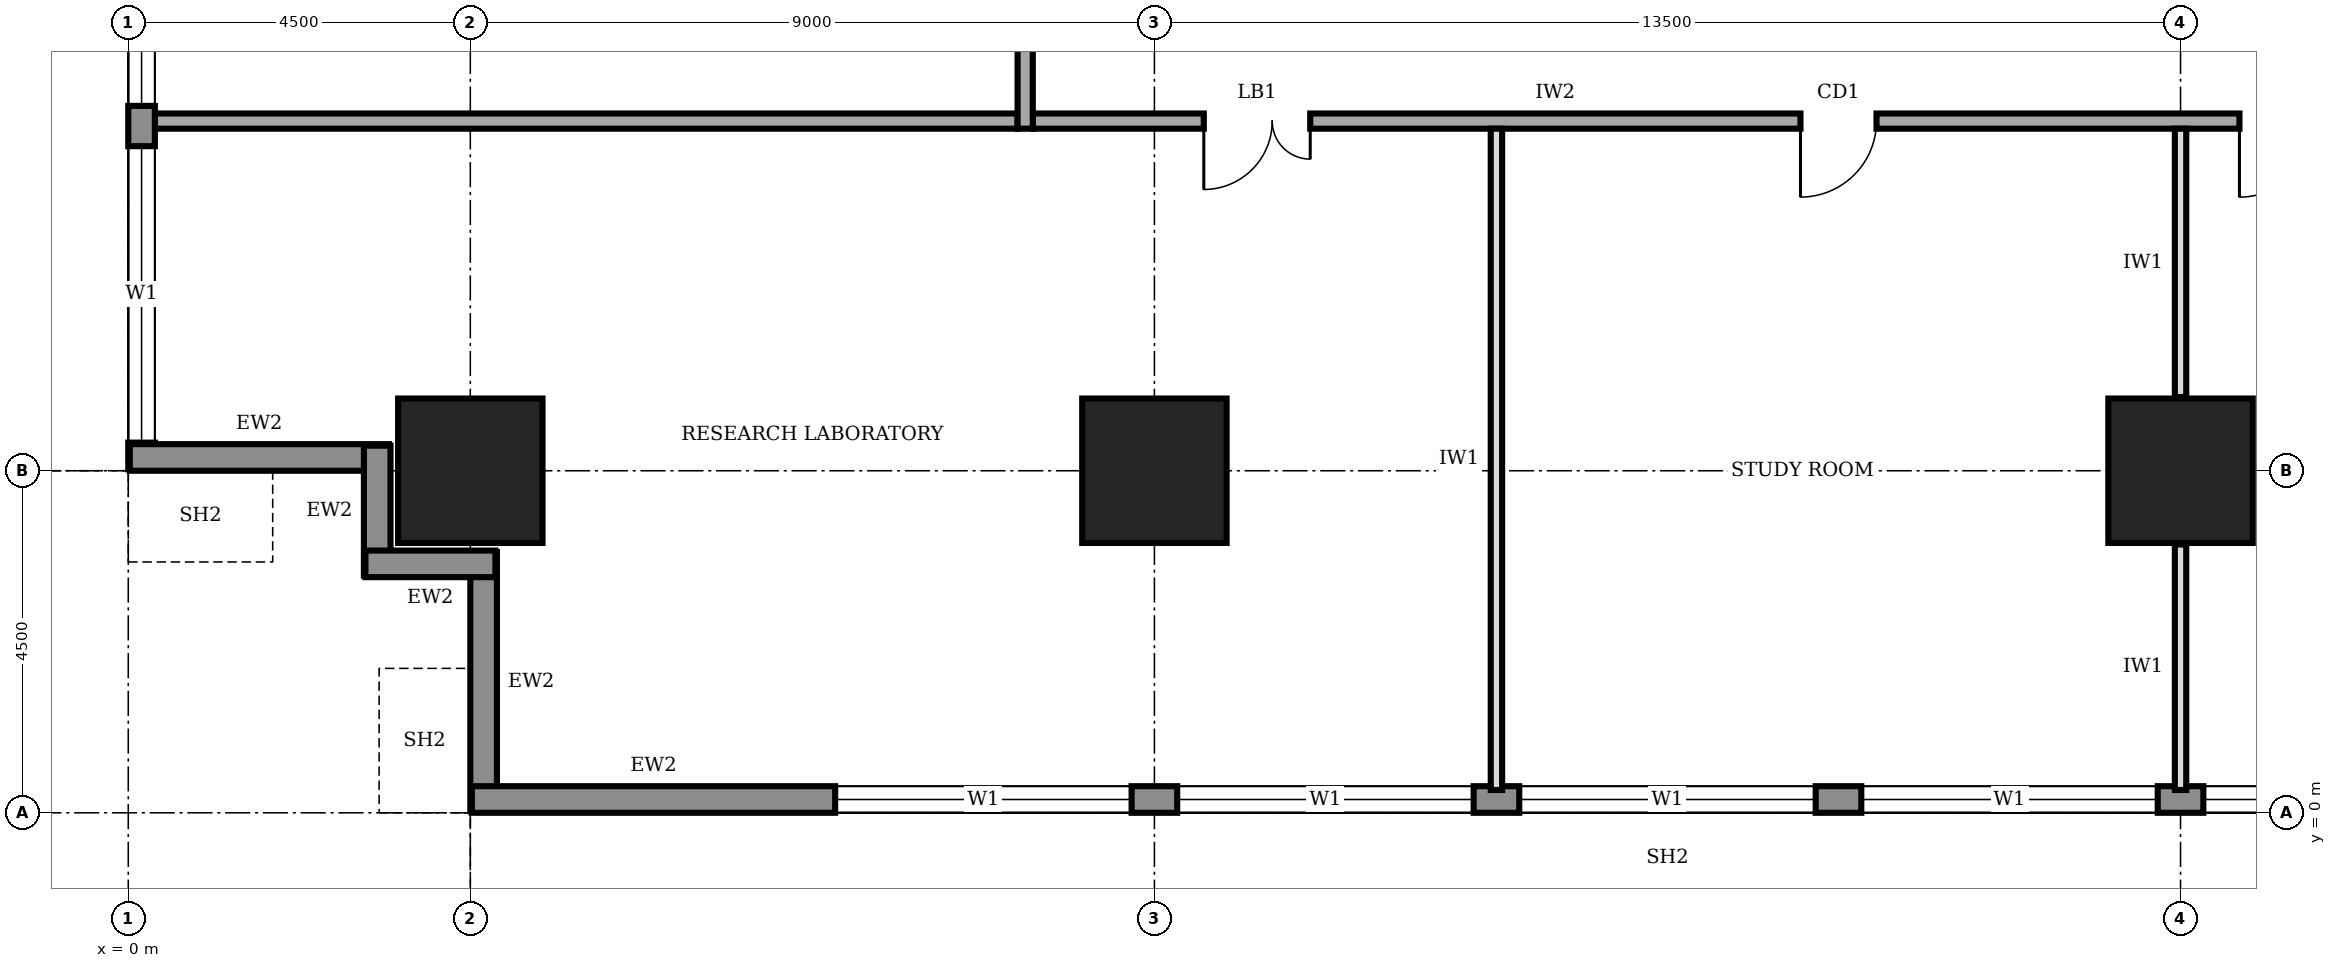
"""IFC4 building model, lengths in metres.
Left out: names, types, materials, properties, quantities, classifications, styles, units other than length and angle.
Written with IfcOpenShell. Run it as: python <this file> out.ifc"""

import sys

from ifc_helpers import new_model, si_unit, direction, frame, frame_2d, origin, origin_2d, place, context, subcontext, project, spatial, rectangle, extrude, element, fill, save


model = new_model("IFC4")
c1 = context("Model", 3, precision=1e-05, world=origin(), true_north=direction((0.0, 1.0)))
c2 = subcontext(c1, "Body", "Model", "MODEL_VIEW")
j1 = project(units=[si_unit("LENGTHUNIT", "METRE"), si_unit("PLANEANGLEUNIT", "RADIAN")], contexts=[c1])
p1 = place(None, origin())
s1 = spatial("IfcSite", under=j1, at=p1, CompositionType="ELEMENT")
p2 = place(p1, origin())
s2 = spatial("IfcBuilding", under=s1, at=p2, CompositionType="ELEMENT")
p3 = place(p2, frame((0.0, 0.0, 121.0)))
s3 = spatial("IfcBuildingStorey", under=s2, at=p3, CompositionType="ELEMENT", Elevation=121.0)
for number, where, z_axis, x_axis in (
    (1, (4.5, 4.5, 0.0), (0.0, 0.0, 1.0), (1.0, 0.0, 0.0)),
    (2, (13.5, 4.5, 0.0), (0.0, 0.0, 1.0), (1.0, 0.0, 0.0)),
    (3, (27.0, 4.5, 0.0), (0.0, 0.0, 1.0), (1.0, 0.0, 0.0)),
):
    element("IfcColumn", number, at=place(p3, frame(where, z_axis=z_axis, x_axis=x_axis)), inside=s3, PredefinedType="COLUMN", context=c2, shape_type="SweptSolid", body=[
        extrude(rectangle(XDim=1.9, YDim=1.9, at=origin_2d()), origin(), (0.0, 0.0, 1.0), 4.0),
    ])
p4 = place(p3, frame((4.675, 3.43, 0.0), z_axis=(0.0, 0.0, 1.0), x_axis=(0.0, -1.0, 0.0)))
e4 = element("IfcWall", 4, at=p4, inside=s3, PredefinedType="STANDARD", context=c2, shape_type="SweptSolid", body=[
    extrude(rectangle(XDim=3.41, YDim=0.35, at=frame_2d((1.705, 0.0))), origin(), (0.0, 0.0, 1.0), 2.85),
])
p5 = place(p3, frame((4.52, 0.175, 0.0), z_axis=(0.0, 0.0, 1.0), x_axis=(1.0, 0.0, 0.0)))
e5 = element("IfcWall", 5, at=p5, inside=s3, PredefinedType="STANDARD", context=c2, shape_type="SweptSolid", body=[
    extrude(rectangle(XDim=31.46, YDim=0.35, at=frame_2d((15.73, 0.0))), origin(), (0.0, 0.0, 1.0), 3.75),
])
p6 = place(p5, frame((4.78, 0.0, 0.9)))
e6 = element("IfcOpeningElement", 6, at=p6, cuts=e5, PredefinedType="OPENING", context=c2, shape_type="SweptSolid", body=[
    extrude(rectangle(XDim=3.9, YDim=2.2, at=frame_2d((1.95, 1.1))), frame((0.0, 0.185, 0.0), z_axis=(0.0, -1.0, 0.0), x_axis=(1.0, 0.0, 0.0)), (0.0, 0.0, 1.0), 0.37),
])
p7 = place(p5, frame((9.28, 0.0, 0.9)))
e7 = element("IfcOpeningElement", 7, at=p7, cuts=e5, PredefinedType="OPENING", context=c2, shape_type="SweptSolid", body=[
    extrude(rectangle(XDim=3.9, YDim=2.2, at=frame_2d((1.95, 1.1))), frame((0.0, 0.185, 0.0), z_axis=(0.0, -1.0, 0.0), x_axis=(1.0, 0.0, 0.0)), (0.0, 0.0, 1.0), 0.37),
])
p8 = place(p5, frame((13.78, 0.0, 0.9)))
e8 = element("IfcOpeningElement", 8, at=p8, cuts=e5, PredefinedType="OPENING", context=c2, shape_type="SweptSolid", body=[
    extrude(rectangle(XDim=3.9, YDim=2.2, at=frame_2d((1.95, 1.1))), frame((0.0, 0.185, 0.0), z_axis=(0.0, -1.0, 0.0), x_axis=(1.0, 0.0, 0.0)), (0.0, 0.0, 1.0), 0.37),
])
p9 = place(p5, frame((18.28, 0.0, 0.9)))
e9 = element("IfcOpeningElement", 9, at=p9, cuts=e5, PredefinedType="OPENING", context=c2, shape_type="SweptSolid", body=[
    extrude(rectangle(XDim=3.9, YDim=2.2, at=frame_2d((1.95, 1.1))), frame((0.0, 0.185, 0.0), z_axis=(0.0, -1.0, 0.0), x_axis=(1.0, 0.0, 0.0)), (0.0, 0.0, 1.0), 0.37),
])
p10 = place(p5, frame((22.78, 0.0, 0.9)))
e10 = element("IfcOpeningElement", 10, at=p10, cuts=e5, PredefinedType="OPENING", context=c2, shape_type="SweptSolid", body=[
    extrude(rectangle(XDim=3.9, YDim=2.2, at=frame_2d((1.95, 1.1))), frame((0.0, 0.185, 0.0), z_axis=(0.0, -1.0, 0.0), x_axis=(1.0, 0.0, 0.0)), (0.0, 0.0, 1.0), 0.37),
])
p11 = place(p5, frame((27.21, 0.0, 0.9)))
e11 = element("IfcOpeningElement", 11, at=p11, cuts=e5, PredefinedType="OPENING", context=c2, shape_type="SweptSolid", body=[
    extrude(rectangle(XDim=3.9, YDim=2.2, at=frame_2d((1.95, 1.1))), frame((0.0, 0.185, 0.0), z_axis=(0.0, -1.0, 0.0), x_axis=(1.0, 0.0, 0.0)), (0.0, 0.0, 1.0), 0.37),
])
p12 = place(p3, frame((0.175, 35.98, 0.0), z_axis=(0.0, 0.0, 1.0), x_axis=(0.0, -1.0, 0.0)))
e12 = element("IfcWall", 12, at=p12, inside=s3, PredefinedType="STANDARD", context=c2, shape_type="SweptSolid", body=[
    extrude(rectangle(XDim=31.46, YDim=0.35, at=frame_2d((15.73, 0.0))), origin(), (0.0, 0.0, 1.0), 3.75),
])
p13 = place(p12, frame((27.21, 0.0, 0.9)))
e13 = element("IfcOpeningElement", 13, at=p13, cuts=e12, PredefinedType="OPENING", context=c2, shape_type="SweptSolid", body=[
    extrude(rectangle(XDim=3.9, YDim=2.2, at=frame_2d((1.95, 1.1))), frame((0.0, 0.185, 0.0), z_axis=(0.0, -1.0, 0.0), x_axis=(1.0, 0.0, 0.0)), (0.0, 0.0, 1.0), 0.37),
])
p14 = place(p12, frame((22.78, 0.0, 0.9)))
e14 = element("IfcOpeningElement", 14, at=p14, cuts=e12, PredefinedType="OPENING", context=c2, shape_type="SweptSolid", body=[
    extrude(rectangle(XDim=3.9, YDim=2.2, at=frame_2d((1.95, 1.1))), frame((0.0, 0.185, 0.0), z_axis=(0.0, -1.0, 0.0), x_axis=(1.0, 0.0, 0.0)), (0.0, 0.0, 1.0), 0.37),
])
p15 = place(p12, frame((18.28, 0.0, 0.9)))
e15 = element("IfcOpeningElement", 15, at=p15, cuts=e12, PredefinedType="OPENING", context=c2, shape_type="SweptSolid", body=[
    extrude(rectangle(XDim=3.9, YDim=2.2, at=frame_2d((1.95, 1.1))), frame((0.0, 0.185, 0.0), z_axis=(0.0, -1.0, 0.0), x_axis=(1.0, 0.0, 0.0)), (0.0, 0.0, 1.0), 0.37),
])
p16 = place(p12, frame((13.78, 0.0, 0.9)))
e16 = element("IfcOpeningElement", 16, at=p16, cuts=e12, PredefinedType="OPENING", context=c2, shape_type="SweptSolid", body=[
    extrude(rectangle(XDim=3.9, YDim=2.2, at=frame_2d((1.95, 1.1))), frame((0.0, 0.185, 0.0), z_axis=(0.0, -1.0, 0.0), x_axis=(1.0, 0.0, 0.0)), (0.0, 0.0, 1.0), 0.37),
])
p17 = place(p12, frame((9.28, 0.0, 0.9)))
e17 = element("IfcOpeningElement", 17, at=p17, cuts=e12, PredefinedType="OPENING", context=c2, shape_type="SweptSolid", body=[
    extrude(rectangle(XDim=3.9, YDim=2.2, at=frame_2d((1.95, 1.1))), frame((0.0, 0.185, 0.0), z_axis=(0.0, -1.0, 0.0), x_axis=(1.0, 0.0, 0.0)), (0.0, 0.0, 1.0), 0.37),
])
p18 = place(p12, frame((4.78, 0.0, 0.9)))
e18 = element("IfcOpeningElement", 18, at=p18, cuts=e12, PredefinedType="OPENING", context=c2, shape_type="SweptSolid", body=[
    extrude(rectangle(XDim=3.9, YDim=2.2, at=frame_2d((1.95, 1.1))), frame((0.0, 0.185, 0.0), z_axis=(0.0, -1.0, 0.0), x_axis=(1.0, 0.0, 0.0)), (0.0, 0.0, 1.0), 0.37),
])
p19 = place(p3, frame((0.02, 4.675, 0.0), z_axis=(0.0, 0.0, 1.0), x_axis=(1.0, 0.0, 0.0)))
e19 = element("IfcWall", 19, at=p19, inside=s3, PredefinedType="STANDARD", context=c2, shape_type="SweptSolid", body=[
    extrude(rectangle(XDim=3.41, YDim=0.35, at=frame_2d((1.705, 0.0))), origin(), (0.0, 0.0, 1.0), 2.85),
])
for number, where, z_axis, x_axis in (
    (20, (3.275, 4.83, 0.0), (0.0, 0.0, 1.0), (0.0, -1.0, 0.0)),
    (21, (3.12, 3.275, 0.0), (0.0, 0.0, 1.0), (1.0, 0.0, 0.0)),
):
    element("IfcWall", number, at=place(p3, frame(where, z_axis=z_axis, x_axis=x_axis)), inside=s3, PredefinedType="STANDARD", context=c2, shape_type="SweptSolid", body=[
        extrude(rectangle(XDim=1.71, YDim=0.35, at=frame_2d((0.855, 0.0))), origin(), (0.0, 0.0, 1.0), 3.75),
    ])
p20 = place(p3, frame((11.9, 9.1, 0.0), z_axis=(0.0, 0.0, 1.0), x_axis=(1.0, 0.0, 0.0)))
e22 = element("IfcWall", 22, at=p20, inside=s3, PredefinedType="SOLIDWALL", context=c2, shape_type="SweptSolid", body=[
    extrude(rectangle(XDim=17.65, YDim=0.2, at=frame_2d((8.825, 0.0))), origin(), (0.0, 0.0, 1.0), 3.75),
])
p21 = place(p20, frame((2.25, 0.0, 0.0)))
e23 = element("IfcOpeningElement", 23, at=p21, cuts=e22, PredefinedType="OPENING", context=c2, shape_type="SweptSolid", body=[
    extrude(rectangle(XDim=1.4, YDim=2.1, at=frame_2d((0.7, 1.05))), frame((0.0, 0.11, 0.0), z_axis=(0.0, -1.0, 0.0), x_axis=(1.0, 0.0, 0.0)), (0.0, 0.0, 1.0), 0.22),
])
p22 = place(p20, frame((10.1, 0.0, 0.0)))
e24 = element("IfcOpeningElement", 24, at=p22, cuts=e22, PredefinedType="OPENING", context=c2, shape_type="SweptSolid", body=[
    extrude(rectangle(XDim=1.0, YDim=2.1, at=frame_2d((0.5, 1.05))), frame((0.0, 0.11, 0.0), z_axis=(0.0, -1.0, 0.0), x_axis=(1.0, 0.0, 0.0)), (0.0, 0.0, 1.0), 0.22),
])
p23 = place(p20, frame((15.875, 0.0, 0.0)))
e25 = element("IfcOpeningElement", 25, at=p23, cuts=e22, PredefinedType="OPENING", context=c2, shape_type="SweptSolid", body=[
    extrude(rectangle(XDim=1.0, YDim=2.1, at=frame_2d((0.5, 1.05))), frame((0.0, 0.11, 0.0), z_axis=(0.0, -1.0, 0.0), x_axis=(1.0, 0.0, 0.0)), (0.0, 0.0, 1.0), 0.22),
])
p24 = place(p3, frame((11.8, 32.05, 0.0), z_axis=(0.0, 0.0, 1.0), x_axis=(0.0, -1.0, 0.0)))
e26 = element("IfcWall", 26, at=p24, inside=s3, PredefinedType="SOLIDWALL", context=c2, shape_type="SweptSolid", body=[
    extrude(rectangle(XDim=23.05, YDim=0.2, at=frame_2d((11.525, 0.0))), origin(), (0.0, 0.0, 1.0), 3.75),
])
p25 = place(p24, frame((20.3, 0.0, 0.0)))
e27 = element("IfcOpeningElement", 27, at=p25, cuts=e26, PredefinedType="OPENING", context=c2, shape_type="SweptSolid", body=[
    extrude(rectangle(XDim=1.0, YDim=2.1, at=frame_2d((0.5, 1.05))), frame((0.0, 0.11, 0.0), z_axis=(0.0, -1.0, 0.0), x_axis=(1.0, 0.0, 0.0)), (0.0, 0.0, 1.0), 0.22),
])
p26 = place(p24, frame((16.4, 0.0, 0.0)))
e28 = element("IfcOpeningElement", 28, at=p26, cuts=e26, PredefinedType="OPENING", context=c2, shape_type="SweptSolid", body=[
    extrude(rectangle(XDim=0.9, YDim=2.1, at=frame_2d((0.45, 1.05))), frame((0.0, 0.11, 0.0), z_axis=(0.0, -1.0, 0.0), x_axis=(1.0, 0.0, 0.0)), (0.0, 0.0, 1.0), 0.22),
])
p27 = place(p24, frame((11.6, 0.0, 0.0)))
e29 = element("IfcOpeningElement", 29, at=p27, cuts=e26, PredefinedType="OPENING", context=c2, shape_type="SweptSolid", body=[
    extrude(rectangle(XDim=0.9, YDim=2.1, at=frame_2d((0.45, 1.05))), frame((0.0, 0.11, 0.0), z_axis=(0.0, -1.0, 0.0), x_axis=(1.0, 0.0, 0.0)), (0.0, 0.0, 1.0), 0.22),
])
p28 = place(p24, frame((8.55, 0.0, 0.0)))
e30 = element("IfcOpeningElement", 30, at=p28, cuts=e26, PredefinedType="OPENING", context=c2, shape_type="SweptSolid", body=[
    extrude(rectangle(XDim=0.9, YDim=2.1, at=frame_2d((0.45, 1.05))), frame((0.0, 0.11, 0.0), z_axis=(0.0, -1.0, 0.0), x_axis=(1.0, 0.0, 0.0)), (0.0, 0.0, 1.0), 0.22),
])
p29 = place(p24, frame((5.55, 0.0, 0.0)))
e31 = element("IfcOpeningElement", 31, at=p29, cuts=e26, PredefinedType="OPENING", context=c2, shape_type="SweptSolid", body=[
    extrude(rectangle(XDim=1.0, YDim=2.1, at=frame_2d((0.5, 1.05))), frame((0.0, 0.11, 0.0), z_axis=(0.0, -1.0, 0.0), x_axis=(1.0, 0.0, 0.0)), (0.0, 0.0, 1.0), 0.22),
])
p30 = place(p24, frame((13.65, 0.0, 0.0)))
e32 = element("IfcOpeningElement", 32, at=p30, cuts=e26, PredefinedType="OPENING", context=c2, shape_type="SweptSolid", body=[
    extrude(rectangle(XDim=1.0, YDim=2.1, at=frame_2d((0.5, 1.05))), frame((0.0, 0.11, 0.0), z_axis=(0.0, -1.0, 0.0), x_axis=(1.0, 0.0, 0.0)), (0.0, 0.0, 1.0), 0.22),
])
p31 = place(p24, frame((1.925, 0.0, 0.0)))
e33 = element("IfcOpeningElement", 33, at=p31, cuts=e26, PredefinedType="OPENING", context=c2, shape_type="SweptSolid", body=[
    extrude(rectangle(XDim=1.0, YDim=2.1, at=frame_2d((0.5, 1.05))), frame((0.0, 0.11, 0.0), z_axis=(0.0, -1.0, 0.0), x_axis=(1.0, 0.0, 0.0)), (0.0, 0.0, 1.0), 0.22),
])
p32 = place(p3, frame((0.3, 9.1, 0.0), z_axis=(0.0, 0.0, 1.0), x_axis=(1.0, 0.0, 0.0)))
e34 = element("IfcWall", 34, at=p32, inside=s3, PredefinedType="SOLIDWALL", context=c2, shape_type="SweptSolid", body=[
    extrude(rectangle(XDim=11.4, YDim=0.2, at=frame_2d((5.7, 0.0))), origin(), (0.0, 0.0, 1.0), 3.75),
])
p33 = place(p3, frame((18.0, 0.3, 0.0), z_axis=(0.0, 0.0, 1.0), x_axis=(0.0, 1.0, 0.0)))
e35 = element("IfcWall", 35, at=p33, inside=s3, PredefinedType="PARTITIONING", context=c2, shape_type="SweptSolid", body=[
    extrude(rectangle(XDim=8.7, YDim=0.15, at=frame_2d((4.35, 0.0))), origin(), (0.0, 0.0, 1.0), 3.75),
])
p34 = place(p3, frame((27.0, 0.3, 0.0), z_axis=(0.0, 0.0, 1.0), x_axis=(0.0, 1.0, 0.0)))
e36 = element("IfcWall", 36, at=p34, inside=s3, PredefinedType="PARTITIONING", context=c2, shape_type="SweptSolid", body=[
    extrude(rectangle(XDim=3.23, YDim=0.15, at=frame_2d((1.615, 0.0))), origin(), (0.0, 0.0, 1.0), 2.85),
])
p35 = place(p3, frame((27.0, 5.47, 0.0), z_axis=(0.0, 0.0, 1.0), x_axis=(0.0, 1.0, 0.0)))
e37 = element("IfcWall", 37, at=p35, inside=s3, PredefinedType="PARTITIONING", context=c2, shape_type="SweptSolid", body=[
    extrude(rectangle(XDim=3.53, YDim=0.15, at=frame_2d((1.765, 0.0))), origin(), (0.0, 0.0, 1.0), 2.85),
])
p36 = place(p6, origin())
e38 = element("IfcWindow", 38, at=p36, inside=s3, PartitioningType="SINGLE_PANEL", PredefinedType="WINDOW", context=c2, shape_type="SweptSolid", body=[
    extrude(rectangle(XDim=3.9, YDim=2.2, at=frame_2d((1.95, 1.1))), frame((0.0, 0.03, 0.0), z_axis=(0.0, -1.0, 0.0), x_axis=(1.0, 0.0, 0.0)), (0.0, 0.0, 1.0), 0.06),
])
fill(e6, e38)
p37 = place(p7, origin())
e39 = element("IfcWindow", 39, at=p37, inside=s3, PartitioningType="SINGLE_PANEL", PredefinedType="WINDOW", context=c2, shape_type="SweptSolid", body=[
    extrude(rectangle(XDim=3.9, YDim=2.2, at=frame_2d((1.95, 1.1))), frame((0.0, 0.03, 0.0), z_axis=(0.0, -1.0, 0.0), x_axis=(1.0, 0.0, 0.0)), (0.0, 0.0, 1.0), 0.06),
])
fill(e7, e39)
p38 = place(p8, origin())
e40 = element("IfcWindow", 40, at=p38, inside=s3, PartitioningType="SINGLE_PANEL", PredefinedType="WINDOW", context=c2, shape_type="SweptSolid", body=[
    extrude(rectangle(XDim=3.9, YDim=2.2, at=frame_2d((1.95, 1.1))), frame((0.0, 0.03, 0.0), z_axis=(0.0, -1.0, 0.0), x_axis=(1.0, 0.0, 0.0)), (0.0, 0.0, 1.0), 0.06),
])
fill(e8, e40)
p39 = place(p9, origin())
e41 = element("IfcWindow", 41, at=p39, inside=s3, PartitioningType="SINGLE_PANEL", PredefinedType="WINDOW", context=c2, shape_type="SweptSolid", body=[
    extrude(rectangle(XDim=3.9, YDim=2.2, at=frame_2d((1.95, 1.1))), frame((0.0, 0.03, 0.0), z_axis=(0.0, -1.0, 0.0), x_axis=(1.0, 0.0, 0.0)), (0.0, 0.0, 1.0), 0.06),
])
fill(e9, e41)
p40 = place(p10, origin())
e42 = element("IfcWindow", 42, at=p40, inside=s3, PartitioningType="SINGLE_PANEL", PredefinedType="WINDOW", context=c2, shape_type="SweptSolid", body=[
    extrude(rectangle(XDim=3.9, YDim=2.2, at=frame_2d((1.95, 1.1))), frame((0.0, 0.03, 0.0), z_axis=(0.0, -1.0, 0.0), x_axis=(1.0, 0.0, 0.0)), (0.0, 0.0, 1.0), 0.06),
])
fill(e10, e42)
p41 = place(p13, origin())
e43 = element("IfcWindow", 43, at=p41, inside=s3, PartitioningType="SINGLE_PANEL", PredefinedType="WINDOW", context=c2, shape_type="SweptSolid", body=[
    extrude(rectangle(XDim=3.9, YDim=2.2, at=frame_2d((1.95, 1.1))), frame((0.0, 0.03, 0.0), z_axis=(0.0, -1.0, 0.0), x_axis=(1.0, 0.0, 0.0)), (0.0, 0.0, 1.0), 0.06),
])
fill(e13, e43)
p42 = place(p14, origin())
e44 = element("IfcWindow", 44, at=p42, inside=s3, PartitioningType="SINGLE_PANEL", PredefinedType="WINDOW", context=c2, shape_type="SweptSolid", body=[
    extrude(rectangle(XDim=3.9, YDim=2.2, at=frame_2d((1.95, 1.1))), frame((0.0, 0.03, 0.0), z_axis=(0.0, -1.0, 0.0), x_axis=(1.0, 0.0, 0.0)), (0.0, 0.0, 1.0), 0.06),
])
fill(e14, e44)
p43 = place(p21, frame((1.4, 0.0, 0.0), z_axis=(0.0, 0.0, 1.0), x_axis=(-1.0, 0.0, 0.0)))
e45 = element("IfcDoor", 45, at=p43, inside=s3, OperationType="DOUBLE_DOOR_SINGLE_SWING", PredefinedType="DOOR", context=c2, shape_type="SweptSolid", body=[
    extrude(rectangle(XDim=1.4, YDim=2.1, at=frame_2d((0.7, 1.05))), frame((0.0, 0.025, 0.0), z_axis=(0.0, -1.0, 0.0), x_axis=(1.0, 0.0, 0.0)), (0.0, 0.0, 1.0), 0.05),
])
fill(e23, e45)
p44 = place(p22, frame((1.0, 0.0, 0.0), z_axis=(0.0, 0.0, 1.0), x_axis=(-1.0, 0.0, 0.0)))
e46 = element("IfcDoor", 46, at=p44, inside=s3, OperationType="SINGLE_SWING_RIGHT", PredefinedType="DOOR", context=c2, shape_type="SweptSolid", body=[
    extrude(rectangle(XDim=1.0, YDim=2.1, at=frame_2d((0.5, 1.05))), frame((0.0, 0.025, 0.0), z_axis=(0.0, -1.0, 0.0), x_axis=(1.0, 0.0, 0.0)), (0.0, 0.0, 1.0), 0.05),
])
fill(e24, e46)
p45 = place(p23, frame((1.0, 0.0, 0.0), z_axis=(0.0, 0.0, 1.0), x_axis=(-1.0, 0.0, 0.0)))
e47 = element("IfcDoor", 47, at=p45, inside=s3, OperationType="SINGLE_SWING_RIGHT", PredefinedType="DOOR", context=c2, shape_type="SweptSolid", body=[
    extrude(rectangle(XDim=1.0, YDim=2.1, at=frame_2d((0.5, 1.05))), frame((0.0, 0.025, 0.0), z_axis=(0.0, -1.0, 0.0), x_axis=(1.0, 0.0, 0.0)), (0.0, 0.0, 1.0), 0.05),
])
fill(e25, e47)
save(model, sys.argv[1])
